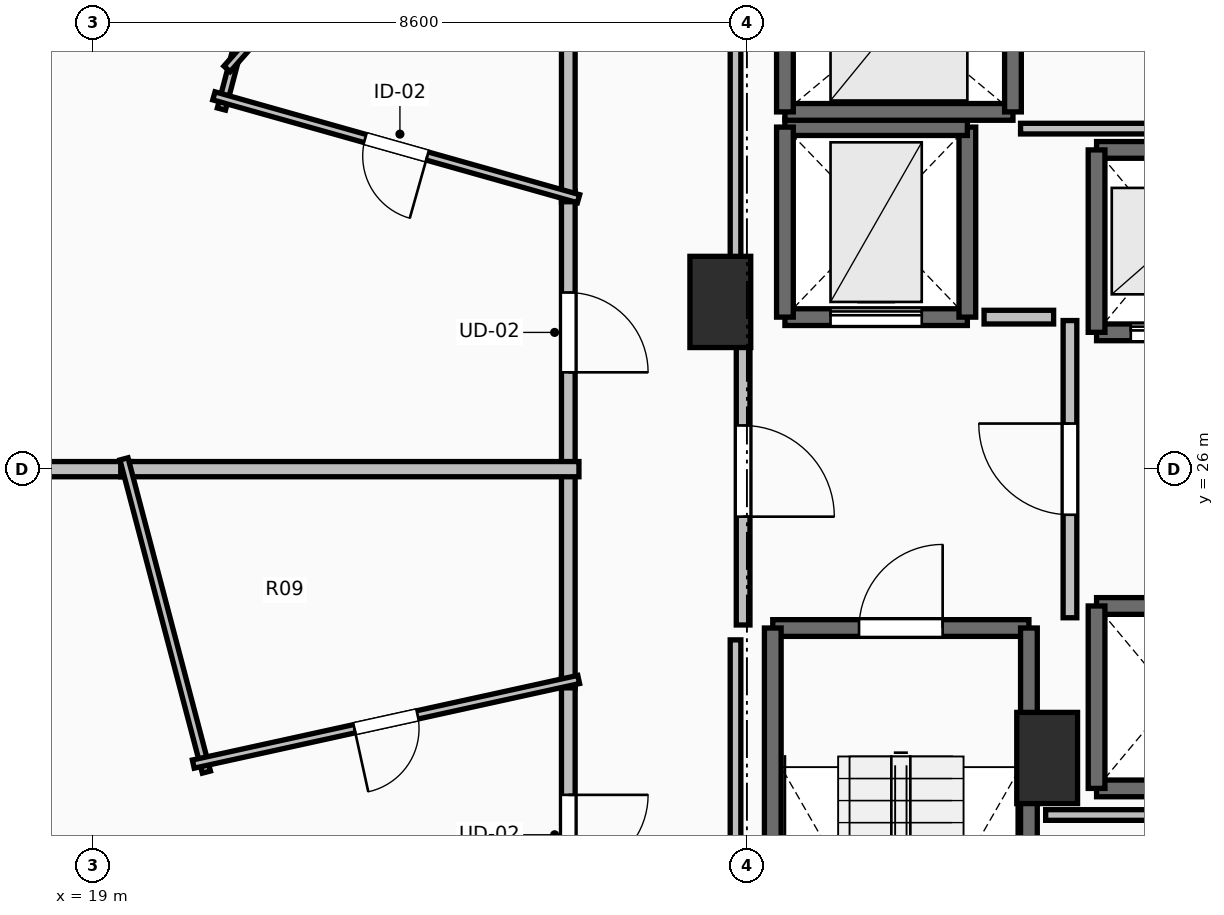
"""IFC4 building model, lengths in metres.
Left out: names, types, materials, properties, quantities, classifications, styles, units other than length and angle.
Written with IfcOpenShell. Run it as: python <this file> out.ifc"""

import sys

from ifc_helpers import new_model, si_unit, direction, frame, frame_2d, origin, origin_2d, place, context, subcontext, project, spatial, rectangle, extrude, element, fill, save


model = new_model("IFC4")
c1 = context("Model", 3, precision=1e-05, world=origin(), true_north=direction((0.0, 1.0)))
c2 = subcontext(c1, "Body", "Model", "MODEL_VIEW")
j1 = project(units=[si_unit("LENGTHUNIT", "METRE"), si_unit("PLANEANGLEUNIT", "RADIAN")], contexts=[c1])
p1 = place(None, origin())
s1 = spatial("IfcSite", under=j1, at=p1, CompositionType="ELEMENT")
p2 = place(p1, origin())
s2 = spatial("IfcBuilding", under=s1, at=p2, CompositionType="ELEMENT")
p3 = place(p2, frame((0.0, 0.0, 62.5)))
s3 = spatial("IfcBuildingStorey", under=s2, at=p3, CompositionType="ELEMENT", Elevation=62.5)
for number, where, z_axis, x_axis in (
    (1, (27.25, 28.2, 0.0), (0.0, 0.0, 1.0), (1.0, 0.0, 0.0)),
    (2, (31.55, 22.2, 0.0), (0.0, 0.0, 1.0), (1.0, 0.0, 0.0)),
):
    element("IfcColumn", number, at=place(p3, frame(where, z_axis=z_axis, x_axis=x_axis)), inside=s3, PredefinedType="PILASTER", context=c2, shape_type="SweptSolid", body=[
        extrude(rectangle(XDim=0.8, YDim=1.2, at=origin_2d()), origin(), (0.0, 0.0, 1.0), 3.5),
    ])
p4 = place(p3, frame((27.94, 23.91, 0.0), z_axis=(0.0, 0.0, 1.0), x_axis=(1.0, 0.0, 0.0)))
e3 = element("IfcWall", 3, at=p4, inside=s3, PredefinedType="SOLIDWALL", context=c2, shape_type="SweptSolid", body=[
    extrude(rectangle(XDim=3.37, YDim=0.22, at=frame_2d((1.685, 0.0))), origin(), (0.0, 0.0, 1.0), 3.24),
])
p5 = place(p4, frame((1.135, 0.0, 0.0)))
e4 = element("IfcOpeningElement", 4, at=p5, cuts=e3, PredefinedType="OPENING", context=c2, shape_type="SweptSolid", body=[
    extrude(rectangle(XDim=1.1, YDim=2.15, at=frame_2d((0.55, 1.075))), frame((0.0, 0.125, 0.0), z_axis=(0.0, -1.0, 0.0), x_axis=(1.0, 0.0, 0.0)), (0.0, 0.0, 1.0), 0.25),
])
for number, where, z_axis, x_axis in (
    (5, (31.31, 23.91, 0.0), (0.0, 0.0, 1.0), (0.0, -1.0, 0.0)),
    (6, (27.94, 16.49, 0.0), (0.0, 0.0, 1.0), (0.0, 1.0, 0.0)),
):
    element("IfcWall", number, at=place(p3, frame(where, z_axis=z_axis, x_axis=x_axis)), inside=s3, PredefinedType="SOLIDWALL", context=c2, shape_type="SweptSolid", body=[
        extrude(rectangle(XDim=7.42, YDim=0.22, at=frame_2d((3.71, 0.0))), origin(), (0.0, 0.0, 1.0), 3.24),
    ])
p6 = place(p3, frame((32.2, 27.8, 0.0), z_axis=(0.0, 0.0, 1.0), x_axis=(1.0, 0.0, 0.0)))
e7 = element("IfcWall", 7, at=p6, inside=s3, PredefinedType="SOLIDWALL", context=c2, shape_type="SweptSolid", body=[
    extrude(rectangle(XDim=2.0, YDim=0.22, at=frame_2d((1.0, 0.0))), origin(), (0.0, 0.0, 1.0), 3.24),
])
p7 = place(p6, frame((0.45, 0.0, 0.0)))
e8 = element("IfcOpeningElement", 8, at=p7, cuts=e7, PredefinedType="OPENING", context=c2, shape_type="SweptSolid", body=[
    extrude(rectangle(XDim=1.1, YDim=2.2, at=frame_2d((0.55, 1.1))), frame((0.0, 0.125, 0.0), z_axis=(0.0, -1.0, 0.0), x_axis=(1.0, 0.0, 0.0)), (0.0, 0.0, 1.0), 0.25),
])
p8 = place(p3, frame((34.2, 30.2, 0.0), z_axis=(0.0, 0.0, 1.0), x_axis=(-1.0, 0.0, 0.0)))
e9 = element("IfcWall", 9, at=p8, inside=s3, PredefinedType="SOLIDWALL", context=c2, shape_type="SweptSolid", body=[
    extrude(rectangle(XDim=2.0, YDim=0.22, at=frame_2d((1.0, 0.0))), origin(), (0.0, 0.0, 1.0), 3.24),
])
p9 = place(p3, frame((32.2, 30.2, 0.0), z_axis=(0.0, 0.0, 1.0), x_axis=(0.0, -1.0, 0.0)))
e10 = element("IfcWall", 10, at=p9, inside=s3, PredefinedType="SOLIDWALL", context=c2, shape_type="SweptSolid", body=[
    extrude(rectangle(XDim=2.4, YDim=0.22, at=frame_2d((1.2, 0.0))), origin(), (0.0, 0.0, 1.0), 3.24),
])
for number, where, z_axis, x_axis in (
    (11, (32.2, 21.8, 0.0), (0.0, 0.0, 1.0), (1.0, 0.0, 0.0)),
    (12, (34.2, 24.2, 0.0), (0.0, 0.0, 1.0), (-1.0, 0.0, 0.0)),
):
    element("IfcWall", number, at=place(p3, frame(where, z_axis=z_axis, x_axis=x_axis)), inside=s3, PredefinedType="SOLIDWALL", context=c2, shape_type="SweptSolid", body=[
        extrude(rectangle(XDim=2.0, YDim=0.22, at=frame_2d((1.0, 0.0))), origin(), (0.0, 0.0, 1.0), 3.24),
    ])
p10 = place(p3, frame((32.2, 24.2, 0.0), z_axis=(0.0, 0.0, 1.0), x_axis=(0.0, -1.0, 0.0)))
e13 = element("IfcWall", 13, at=p10, inside=s3, PredefinedType="SOLIDWALL", context=c2, shape_type="SweptSolid", body=[
    extrude(rectangle(XDim=2.4, YDim=0.22, at=frame_2d((1.2, 0.0))), origin(), (0.0, 0.0, 1.0), 3.24),
])
p11 = place(p3, frame((28.1, 28.0, 0.0), z_axis=(0.0, 0.0, 1.0), x_axis=(1.0, 0.0, 0.0)))
e14 = element("IfcWall", 14, at=p11, inside=s3, PredefinedType="SHEAR", context=c2, shape_type="SweptSolid", body=[
    extrude(rectangle(XDim=2.4, YDim=0.22, at=frame_2d((1.2, 0.0))), origin(), (0.0, 0.0, 1.0), 3.24),
])
p12 = place(p11, frame((0.6, 0.0, 0.0)))
e15 = element("IfcOpeningElement", 15, at=p12, cuts=e14, PredefinedType="OPENING", context=c2, shape_type="SweptSolid", body=[
    extrude(rectangle(XDim=1.2, YDim=2.2, at=frame_2d((0.6, 1.1))), frame((0.0, 0.125, 0.0), z_axis=(0.0, -1.0, 0.0), x_axis=(1.0, 0.0, 0.0)), (0.0, 0.0, 1.0), 0.25),
])
p13 = place(p3, frame((30.5, 28.0, 0.0), z_axis=(0.0, 0.0, 1.0), x_axis=(0.0, 1.0, 0.0)))
e16 = element("IfcWall", 16, at=p13, inside=s3, PredefinedType="SHEAR", context=c2, shape_type="SweptSolid", body=[
    extrude(rectangle(XDim=2.5, YDim=0.22, at=frame_2d((1.25, 0.0))), origin(), (0.0, 0.0, 1.0), 3.24),
])
p14 = place(p3, frame((30.5, 30.5, 0.0), z_axis=(0.0, 0.0, 1.0), x_axis=(-1.0, 0.0, 0.0)))
e17 = element("IfcWall", 17, at=p14, inside=s3, PredefinedType="SHEAR", context=c2, shape_type="SweptSolid", body=[
    extrude(rectangle(XDim=2.4, YDim=0.22, at=frame_2d((1.2, 0.0))), origin(), (0.0, 0.0, 1.0), 3.24),
])
p15 = place(p3, frame((28.1, 30.5, 0.0), z_axis=(0.0, 0.0, 1.0), x_axis=(0.0, -1.0, 0.0)))
e18 = element("IfcWall", 18, at=p15, inside=s3, PredefinedType="SHEAR", context=c2, shape_type="SweptSolid", body=[
    extrude(rectangle(XDim=2.5, YDim=0.22, at=frame_2d((1.25, 0.0))), origin(), (0.0, 0.0, 1.0), 3.24),
])
p16 = place(p3, frame((28.1, 30.7, 0.0), z_axis=(0.0, 0.0, 1.0), x_axis=(1.0, 0.0, 0.0)))
e19 = element("IfcWall", 19, at=p16, inside=s3, PredefinedType="SOLIDWALL", context=c2, shape_type="SweptSolid", body=[
    extrude(rectangle(XDim=3.0, YDim=0.22, at=frame_2d((1.5, 0.0))), origin(), (0.0, 0.0, 1.0), 3.24),
])
for number, where, z_axis, x_axis in (
    (20, (31.1, 30.7, 0.0), (0.0, 0.0, 1.0), (0.0, 1.0, 0.0)),
    (21, (28.1, 33.2, 0.0), (0.0, 0.0, 1.0), (0.0, -1.0, 0.0)),
):
    element("IfcWall", number, at=place(p3, frame(where, z_axis=z_axis, x_axis=x_axis)), inside=s3, PredefinedType="SOLIDWALL", context=c2, shape_type="SweptSolid", body=[
        extrude(rectangle(XDim=2.5, YDim=0.22, at=frame_2d((1.25, 0.0))), origin(), (0.0, 0.0, 1.0), 3.24),
    ])
p17 = place(p3, frame((31.85, 24.045, 0.0), z_axis=(0.0, 0.0, 1.0), x_axis=(0.0, 1.0, 0.0)))
e22 = element("IfcWall", 22, at=p17, inside=s3, PredefinedType="PARTITIONING", context=c2, shape_type="SweptSolid", body=[
    extrude(rectangle(XDim=3.91, YDim=0.18, at=frame_2d((1.955, 0.0))), origin(), (0.0, 0.0, 1.0), 3.24),
])
p18 = place(p17, frame((1.355, 0.0, 0.0)))
e23 = element("IfcOpeningElement", 23, at=p18, cuts=e22, PredefinedType="OPENING", context=c2, shape_type="SweptSolid", body=[
    extrude(rectangle(XDim=1.2, YDim=2.15, at=frame_2d((0.6, 1.075))), frame((0.0, 0.105, 0.0), z_axis=(0.0, -1.0, 0.0), x_axis=(1.0, 0.0, 0.0)), (0.0, 0.0, 1.0), 0.21),
])
p19 = place(p3, frame((27.55, 28.0, 0.0), z_axis=(0.0, 0.0, 1.0), x_axis=(0.0, -1.0, 0.0)))
e24 = element("IfcWall", 24, at=p19, inside=s3, PredefinedType="PARTITIONING", context=c2, shape_type="SweptSolid", body=[
    extrude(rectangle(XDim=4.05, YDim=0.18, at=frame_2d((2.025, 0.0))), origin(), (0.0, 0.0, 1.0), 3.24),
])
p20 = place(p19, frame((1.425, 0.0, 0.0)))
e25 = element("IfcOpeningElement", 25, at=p20, cuts=e24, PredefinedType="OPENING", context=c2, shape_type="SweptSolid", body=[
    extrude(rectangle(XDim=1.2, YDim=2.15, at=frame_2d((0.6, 1.075))), frame((0.0, 0.105, 0.0), z_axis=(0.0, -1.0, 0.0), x_axis=(1.0, 0.0, 0.0)), (0.0, 0.0, 1.0), 0.21),
])
p21 = place(p3, frame((25.25, 29.658, 0.0), z_axis=(0.0, 0.0, 1.0), x_axis=(0.0, -1.0, 0.0)))
e26 = element("IfcWall", 26, at=p21, inside=s3, PredefinedType="PARTITIONING", context=c2, shape_type="SweptSolid", body=[
    extrude(rectangle(XDim=3.718, YDim=0.18, at=frame_2d((1.859, 0.0))), origin(), (0.0, 0.0, 1.0), 2.432),
])
p22 = place(p21, frame((1.334, 0.0, 0.0)))
e27 = element("IfcOpeningElement", 27, at=p22, cuts=e26, PredefinedType="OPENING", context=c2, shape_type="SweptSolid", body=[
    extrude(rectangle(XDim=1.05, YDim=2.2, at=frame_2d((0.525, 1.1))), frame((0.0, 0.105, 0.0), z_axis=(0.0, -1.0, 0.0), x_axis=(1.0, 0.0, 0.0)), (0.0, 0.0, 1.0), 0.21),
])
p23 = place(p3, frame((25.25, 32.895, 0.0), z_axis=(0.0, 0.0, 1.0), x_axis=(0.0, -1.0, 0.0)))
e28 = element("IfcWall", 28, at=p23, inside=s3, PredefinedType="PARTITIONING", context=c2, shape_type="SweptSolid", body=[
    extrude(rectangle(XDim=3.377, YDim=0.18, at=frame_2d((1.688, 0.0))), origin(), (0.0, 0.0, 1.0), 3.24),
])
p24 = place(p3, frame((25.25, 23.263, 0.0), z_axis=(0.0, 0.0, 1.0), x_axis=(0.0, -1.0, 0.0)))
e29 = element("IfcWall", 29, at=p24, inside=s3, PredefinedType="PARTITIONING", context=c2, shape_type="SweptSolid", body=[
    extrude(rectangle(XDim=4.146, YDim=0.18, at=frame_2d((2.073, 0.0))), origin(), (0.0, 0.0, 1.0), 3.24),
])
p25 = place(p24, frame((1.548, 0.0, 0.0)))
e30 = element("IfcOpeningElement", 30, at=p25, cuts=e29, PredefinedType="OPENING", context=c2, shape_type="SweptSolid", body=[
    extrude(rectangle(XDim=1.05, YDim=2.2, at=frame_2d((0.525, 1.1))), frame((0.0, 0.105, 0.0), z_axis=(0.0, -1.0, 0.0), x_axis=(1.0, 0.0, 0.0)), (0.0, 0.0, 1.0), 0.21),
])
p26 = place(p3, frame((25.25, 26.08, 0.0), z_axis=(0.0, 0.0, 1.0), x_axis=(0.0, -1.0, 0.0)))
e31 = element("IfcWall", 31, at=p26, inside=s3, PredefinedType="PARTITIONING", context=c2, shape_type="SweptSolid", body=[
    extrude(rectangle(XDim=2.957, YDim=0.18, at=frame_2d((1.479, 0.0))), origin(), (0.0, 0.0, 1.0), 3.24),
])
p27 = place(p3, frame((20.686, 30.738, 0.0), z_axis=(0.0, 0.0, 1.0), x_axis=(0.254583995409, 0.967050665313, 0.0)))
e32 = element("IfcWall", 32, at=p27, inside=s3, PredefinedType="PARTITIONING", context=c2, shape_type="SweptSolid", body=[
    extrude(rectangle(XDim=0.795, YDim=0.11, at=frame_2d((0.397, 0.0))), origin(), (0.0, 0.0, 1.0), 2.432),
])
p28 = place(p3, frame((20.76, 31.266, 0.0), z_axis=(0.0, 0.0, 1.0), x_axis=(0.662136072578, 0.74938362765, 0.0)))
e33 = element("IfcWall", 33, at=p28, inside=s3, PredefinedType="PARTITIONING", context=c2, shape_type="SweptSolid", body=[
    extrude(rectangle(XDim=3.719, YDim=0.11, at=frame_2d((1.859, 0.0))), origin(), (0.0, 0.0, 1.0), 3.24),
])
p29 = place(p3, frame((25.385, 29.558, 0.0), z_axis=(0.0, 0.0, 1.0), x_axis=(-0.962466408657, 0.271400833098, 0.0)))
e34 = element("IfcWall", 34, at=p29, inside=s3, PredefinedType="PARTITIONING", context=c2, shape_type="SweptSolid", body=[
    extrude(rectangle(XDim=4.984, YDim=0.11, at=frame_2d((2.492, 0.0))), origin(), (0.0, 0.0, 1.0), 2.432),
])
p30 = place(p29, frame((2.067, 0.0, 0.0)))
e35 = element("IfcOpeningElement", 35, at=p30, cuts=e34, PredefinedType="OPENING", context=c2, shape_type="SweptSolid", body=[
    extrude(rectangle(XDim=0.85, YDim=2.1, at=frame_2d((0.425, 1.05))), frame((0.0, 0.07, 0.0), z_axis=(0.0, -1.0, 0.0), x_axis=(1.0, 0.0, 0.0)), (0.0, 0.0, 1.0), 0.14),
])
p31 = place(p3, frame((8.451, 26.0, 0.0), z_axis=(0.0, 0.0, 1.0), x_axis=(1.0, 0.0, 0.0)))
e36 = element("IfcWall", 36, at=p31, inside=s3, PredefinedType="PARTITIONING", context=c2, shape_type="SweptSolid", body=[
    extrude(rectangle(XDim=11.051, YDim=0.2, at=frame_2d((5.525, 0.0))), origin(), (0.0, 0.0, 1.0), 2.432),
])
p32 = place(p3, frame((19.362, 26.0, 0.0), z_axis=(0.0, 0.0, 1.0), x_axis=(1.0, 0.0, 0.0)))
e37 = element("IfcWall", 37, at=p32, inside=s3, PredefinedType="PARTITIONING", context=c2, shape_type="SweptSolid", body=[
    extrude(rectangle(XDim=6.028, YDim=0.2, at=frame_2d((3.014, 0.0))), origin(), (0.0, 0.0, 1.0), 2.874),
])
p33 = place(p3, frame((20.489, 22.015, 0.0), z_axis=(0.0, 0.0, 1.0), x_axis=(-0.254448175288, 0.967086410872, 0.0)))
e38 = element("IfcWall", 38, at=p33, inside=s3, PredefinedType="PARTITIONING", context=c2, shape_type="SweptSolid", body=[
    extrude(rectangle(XDim=4.261, YDim=0.11, at=frame_2d((2.13, 0.0))), origin(), (0.0, 0.0, 1.0), 3.24),
])
p34 = place(p3, frame((25.387, 23.233, 0.0), z_axis=(0.0, 0.0, 1.0), x_axis=(-0.976752510269, -0.214370085796, 0.0)))
e39 = element("IfcWall", 39, at=p34, inside=s3, PredefinedType="PARTITIONING", context=c2, shape_type="SweptSolid", body=[
    extrude(rectangle(XDim=5.191, YDim=0.11, at=frame_2d((2.595, 0.0))), origin(), (0.0, 0.0, 1.0), 2.874),
])
p35 = place(p34, frame((2.171, 0.0, 0.0)))
e40 = element("IfcOpeningElement", 40, at=p35, cuts=e39, PredefinedType="OPENING", context=c2, shape_type="SweptSolid", body=[
    extrude(rectangle(XDim=0.85, YDim=2.1, at=frame_2d((0.425, 1.05))), frame((0.0, 0.07, 0.0), z_axis=(0.0, -1.0, 0.0), x_axis=(1.0, 0.0, 0.0)), (0.0, 0.0, 1.0), 0.14),
])
p36 = place(p3, frame((31.635, 28.0, 0.0), z_axis=(0.0, 0.0, 1.0), x_axis=(-1.0, 0.0, 0.0)))
e41 = element("IfcWall", 41, at=p36, inside=s3, PredefinedType="PARTITIONING", context=c2, shape_type="SweptSolid", body=[
    extrude(rectangle(XDim=0.915, YDim=0.18, at=frame_2d((0.458, 0.0))), origin(), (0.0, 0.0, 1.0), 3.24),
])
p37 = place(p3, frame((31.2, 30.48, 0.0), z_axis=(0.0, 0.0, 1.0), x_axis=(1.0, 0.0, 0.0)))
e42 = element("IfcWall", 42, at=p37, inside=s3, PredefinedType="PARTITIONING", context=c2, shape_type="SweptSolid", body=[
    extrude(rectangle(XDim=2.05, YDim=0.14, at=frame_2d((1.025, 0.0))), origin(), (0.0, 0.0, 1.0), 3.24),
])
p38 = place(p3, frame((36.439, 21.45, 0.0), z_axis=(0.0, 0.0, 1.0), x_axis=(-1.0, 0.0, 0.0)))
e43 = element("IfcWall", 43, at=p38, inside=s3, PredefinedType="PARTITIONING", context=c2, shape_type="SweptSolid", body=[
    extrude(rectangle(XDim=4.909, YDim=0.14, at=frame_2d((2.455, 0.0))), origin(), (0.0, 0.0, 1.0), 3.24),
])
p39 = place(p3, frame((27.45, 16.24, 0.0), z_axis=(0.0, 0.0, 1.0), x_axis=(0.0, 1.0, 0.0)))
e44 = element("IfcWall", 44, at=p39, inside=s3, PredefinedType="PARTITIONING", context=c2, shape_type="SweptSolid", body=[
    extrude(rectangle(XDim=7.514, YDim=0.14, at=frame_2d((3.757, 0.0))), origin(), (0.0, 0.0, 1.0), 2.432),
])
p40 = place(p3, frame((27.45, 28.196, 0.0), z_axis=(0.0, 0.0, 1.0), x_axis=(0.0, 1.0, 0.0)))
e45 = element("IfcWall", 45, at=p40, inside=s3, PredefinedType="PARTITIONING", context=c2, shape_type="SweptSolid", body=[
    extrude(rectangle(XDim=5.254, YDim=0.14, at=frame_2d((2.627, 0.0))), origin(), (0.0, 0.0, 1.0), 2.432),
])
p41 = place(p5, origin())
e46 = element("IfcDoor", 46, at=p41, inside=s3, OperationType="SINGLE_SWING_RIGHT", PredefinedType="DOOR", context=c2, shape_type="SweptSolid", body=[
    extrude(rectangle(XDim=1.1, YDim=2.15, at=frame_2d((0.55, 1.075))), frame((0.0, 0.025, 0.0), z_axis=(0.0, -1.0, 0.0), x_axis=(1.0, 0.0, 0.0)), (0.0, 0.0, 1.0), 0.05),
])
fill(e4, e46)
p42 = place(p7, origin())
e47 = element("IfcDoor", 47, at=p42, inside=s3, OperationType="SLIDING_TO_LEFT", PredefinedType="DOOR", context=c2, shape_type="SweptSolid", body=[
    extrude(rectangle(XDim=1.1, YDim=2.2, at=frame_2d((0.55, 1.1))), frame((0.0, 0.025, 0.0), z_axis=(0.0, -1.0, 0.0), x_axis=(1.0, 0.0, 0.0)), (0.0, 0.0, 1.0), 0.05),
])
fill(e8, e47)
p43 = place(p12, origin())
e48 = element("IfcDoor", 48, at=p43, inside=s3, OperationType="SLIDING_TO_LEFT", PredefinedType="DOOR", context=c2, shape_type="SweptSolid", body=[
    extrude(rectangle(XDim=1.2, YDim=2.2, at=frame_2d((0.6, 1.1))), frame((0.0, 0.025, 0.0), z_axis=(0.0, -1.0, 0.0), x_axis=(1.0, 0.0, 0.0)), (0.0, 0.0, 1.0), 0.05),
])
fill(e15, e48)
p44 = place(p18, origin())
e49 = element("IfcDoor", 49, at=p44, inside=s3, OperationType="SINGLE_SWING_RIGHT", PredefinedType="DOOR", context=c2, shape_type="SweptSolid", body=[
    extrude(rectangle(XDim=1.2, YDim=2.15, at=frame_2d((0.6, 1.075))), frame((0.0, 0.025, 0.0), z_axis=(0.0, -1.0, 0.0), x_axis=(1.0, 0.0, 0.0)), (0.0, 0.0, 1.0), 0.05),
])
fill(e23, e49)
p45 = place(p20, origin())
e50 = element("IfcDoor", 50, at=p45, inside=s3, OperationType="SINGLE_SWING_RIGHT", PredefinedType="DOOR", context=c2, shape_type="SweptSolid", body=[
    extrude(rectangle(XDim=1.2, YDim=2.15, at=frame_2d((0.6, 1.075))), frame((0.0, 0.025, 0.0), z_axis=(0.0, -1.0, 0.0), x_axis=(1.0, 0.0, 0.0)), (0.0, 0.0, 1.0), 0.05),
])
fill(e25, e50)
p46 = place(p22, origin())
e51 = element("IfcDoor", 51, at=p46, inside=s3, OperationType="SINGLE_SWING_RIGHT", PredefinedType="DOOR", context=c2, shape_type="SweptSolid", body=[
    extrude(rectangle(XDim=1.05, YDim=2.2, at=frame_2d((0.525, 1.1))), frame((0.0, 0.025, 0.0), z_axis=(0.0, -1.0, 0.0), x_axis=(1.0, 0.0, 0.0)), (0.0, 0.0, 1.0), 0.05),
])
fill(e27, e51)
p47 = place(p25, origin())
e52 = element("IfcDoor", 52, at=p47, inside=s3, OperationType="SINGLE_SWING_LEFT", PredefinedType="DOOR", context=c2, shape_type="SweptSolid", body=[
    extrude(rectangle(XDim=1.05, YDim=2.2, at=frame_2d((0.525, 1.1))), frame((0.0, 0.025, 0.0), z_axis=(0.0, -1.0, 0.0), x_axis=(1.0, 0.0, 0.0)), (0.0, 0.0, 1.0), 0.05),
])
fill(e30, e52)
p48 = place(p30, origin())
e53 = element("IfcDoor", 53, at=p48, inside=s3, OperationType="SINGLE_SWING_LEFT", PredefinedType="DOOR", context=c2, shape_type="SweptSolid", body=[
    extrude(rectangle(XDim=0.85, YDim=2.1, at=frame_2d((0.425, 1.05))), frame((0.0, 0.025, 0.0), z_axis=(0.0, -1.0, 0.0), x_axis=(1.0, 0.0, 0.0)), (0.0, 0.0, 1.0), 0.05),
])
fill(e35, e53)
p49 = place(p35, origin())
e54 = element("IfcDoor", 54, at=p49, inside=s3, OperationType="SINGLE_SWING_RIGHT", PredefinedType="DOOR", context=c2, shape_type="SweptSolid", body=[
    extrude(rectangle(XDim=0.85, YDim=2.1, at=frame_2d((0.425, 1.05))), frame((0.0, 0.025, 0.0), z_axis=(0.0, -1.0, 0.0), x_axis=(1.0, 0.0, 0.0)), (0.0, 0.0, 1.0), 0.05),
])
fill(e40, e54)
save(model, sys.argv[1])
